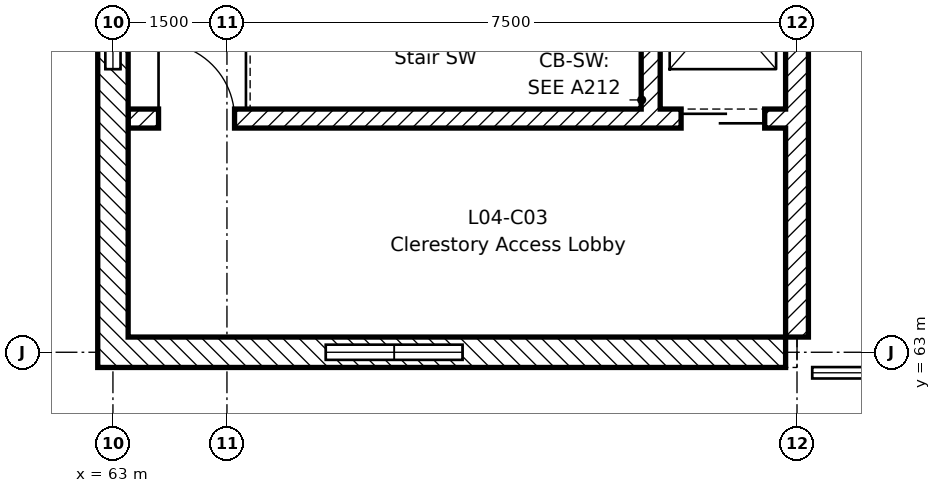
"""IFC4 building model, lengths in metres.
Left out: names, types, materials, properties, quantities, classifications, styles, units other than length and angle.
Written with IfcOpenShell. Run it as: python <this file> out.ifc"""

import sys

from ifc_helpers import new_model, si_unit, direction, frame, frame_2d, origin, place, context, subcontext, project, spatial, rectangle, extrude, element, fill, save


model = new_model("IFC4")
c1 = context("Model", 3, precision=1e-05, world=origin(), true_north=direction((0.0, 1.0)))
c2 = subcontext(c1, "Body", "Model", "MODEL_VIEW")
j1 = project(units=[si_unit("LENGTHUNIT", "METRE"), si_unit("PLANEANGLEUNIT", "RADIAN")], contexts=[c1])
p1 = place(None, origin())
s1 = spatial("IfcSite", under=j1, at=p1, CompositionType="ELEMENT")
p2 = place(p1, origin())
s2 = spatial("IfcBuilding", under=s1, at=p2, CompositionType="ELEMENT")
p3 = place(p2, frame((0.0, 0.0, 18.6)))
s3 = spatial("IfcBuildingStorey", under=s2, at=p3, CompositionType="ELEMENT", Elevation=18.6)
p4 = place(p3, frame((72.0, 63.2, 0.0), z_axis=(0.0, 0.0, 1.0), x_axis=(0.0, 1.0, 0.0)))
e1 = element("IfcWall", 1, at=p4, inside=s3, PredefinedType="SHEAR", context=c2, shape_type="SweptSolid", body=[
    extrude(rectangle(XDim=8.95, YDim=0.3, at=frame_2d((4.475, 0.0))), origin(), (0.0, 0.0, 1.0), 3.95),
])
p5 = place(p3, frame((63.2, 66.075, 0.0), z_axis=(0.0, 0.0, 1.0), x_axis=(1.0, 0.0, 0.0)))
e2 = element("IfcWall", 2, at=p5, inside=s3, PredefinedType="SHEAR", context=c2, shape_type="SweptSolid", body=[
    extrude(rectangle(XDim=8.65, YDim=0.25, at=frame_2d((4.325, 0.0))), origin(), (0.0, 0.0, 1.0), 3.95),
])
p6 = place(p5, frame((0.4, 0.0, 0.0)))
e3 = element("IfcOpeningElement", 3, at=p6, cuts=e2, PredefinedType="OPENING", context=c2, shape_type="SweptSolid", body=[
    extrude(rectangle(XDim=1.0, YDim=2.1, at=frame_2d((0.5, 1.05))), frame((0.0, 0.135, 0.0), z_axis=(0.0, -1.0, 0.0), x_axis=(1.0, 0.0, 0.0)), (0.0, 0.0, 1.0), 0.27),
])
p7 = place(p5, frame((7.275, 0.0, 0.0)))
e4 = element("IfcOpeningElement", 4, at=p7, cuts=e2, PredefinedType="OPENING", context=c2, shape_type="SweptSolid", body=[
    extrude(rectangle(XDim=1.1, YDim=2.1, at=frame_2d((0.55, 1.05))), frame((0.0, 0.135, 0.0), z_axis=(0.0, -1.0, 0.0), x_axis=(1.0, 0.0, 0.0)), (0.0, 0.0, 1.0), 0.27),
])
p8 = place(p3, frame((70.075, 66.2, 0.0), z_axis=(0.0, 0.0, 1.0), x_axis=(0.0, 1.0, 0.0)))
e5 = element("IfcWall", 5, at=p8, inside=s3, PredefinedType="SHEAR", context=c2, shape_type="SweptSolid", body=[
    extrude(rectangle(XDim=2.85, YDim=0.25, at=frame_2d((1.425, 0.0))), origin(), (0.0, 0.0, 1.0), 3.95),
])
p9 = place(p3, frame((62.8, 63.0, 0.0), z_axis=(0.0, 0.0, 1.0), x_axis=(1.0, 0.0, 0.0)))
e6 = element("IfcWall", 6, at=p9, inside=s3, PredefinedType="STANDARD", context=c2, shape_type="SweptSolid", body=[
    extrude(rectangle(XDim=3.0, YDim=0.4, at=frame_2d((1.5, 0.0))), origin(), (0.0, 0.0, 1.0), 3.95),
])
p10 = place(p3, frame((67.6, 63.0, 0.0), z_axis=(0.0, 0.0, 1.0), x_axis=(1.0, 0.0, 0.0)))
e7 = element("IfcWall", 7, at=p10, inside=s3, PredefinedType="STANDARD", context=c2, shape_type="SweptSolid", body=[
    extrude(rectangle(XDim=4.25, YDim=0.4, at=frame_2d((2.125, 0.0))), origin(), (0.0, 0.0, 1.0), 3.95),
])
p11 = place(p3, frame((65.8, 63.0, 0.0), z_axis=(0.0, 0.0, 1.0), x_axis=(1.0, 0.0, 0.0)))
e8 = element("IfcWall", 8, at=p11, inside=s3, PredefinedType="STANDARD", context=c2, shape_type="SweptSolid", body=[
    extrude(rectangle(XDim=1.8, YDim=0.4, at=frame_2d((0.9, 0.0))), origin(), (0.0, 0.0, 1.0), 0.9),
])
p12 = place(p3, frame((63.0, 63.2, 0.0), z_axis=(0.0, 0.0, 1.0), x_axis=(0.0, 1.0, 0.0)))
e9 = element("IfcWall", 9, at=p12, inside=s3, PredefinedType="STANDARD", context=c2, shape_type="SweptSolid", body=[
    extrude(rectangle(XDim=3.525, YDim=0.4, at=frame_2d((1.763, 0.0))), origin(), (0.0, 0.0, 1.0), 3.95),
])
p13 = place(p3, frame((63.0, 66.725, 0.0), z_axis=(0.0, 0.0, 1.0), x_axis=(0.0, 1.0, 0.0)))
e10 = element("IfcWall", 10, at=p13, inside=s3, PredefinedType="STANDARD", context=c2, shape_type="SweptSolid", body=[
    extrude(rectangle(XDim=1.8, YDim=0.4, at=frame_2d((0.9, 0.0))), origin(), (0.0, 0.0, 1.0), 0.9),
])
p14 = place(p6, origin())
e11 = element("IfcDoor", 11, at=p14, inside=s3, OperationType="SINGLE_SWING_LEFT", PredefinedType="DOOR", context=c2, shape_type="SweptSolid", body=[
    extrude(rectangle(XDim=1.0, YDim=2.1, at=frame_2d((0.5, 1.05))), frame((0.0, 0.025, 0.0), z_axis=(0.0, -1.0, 0.0), x_axis=(1.0, 0.0, 0.0)), (0.0, 0.0, 1.0), 0.05),
])
fill(e3, e11)
p15 = place(p7, frame((1.1, 0.0, 0.0), z_axis=(0.0, 0.0, 1.0), x_axis=(-1.0, 0.0, 0.0)))
e12 = element("IfcDoor", 12, at=p15, inside=s3, OperationType="SLIDING_TO_LEFT", PredefinedType="DOOR", context=c2, shape_type="SweptSolid", body=[
    extrude(rectangle(XDim=1.1, YDim=2.1, at=frame_2d((0.55, 1.05))), frame((0.0, 0.025, 0.0), z_axis=(0.0, -1.0, 0.0), x_axis=(1.0, 0.0, 0.0)), (0.0, 0.0, 1.0), 0.05),
])
fill(e4, e12)
save(model, sys.argv[1])
